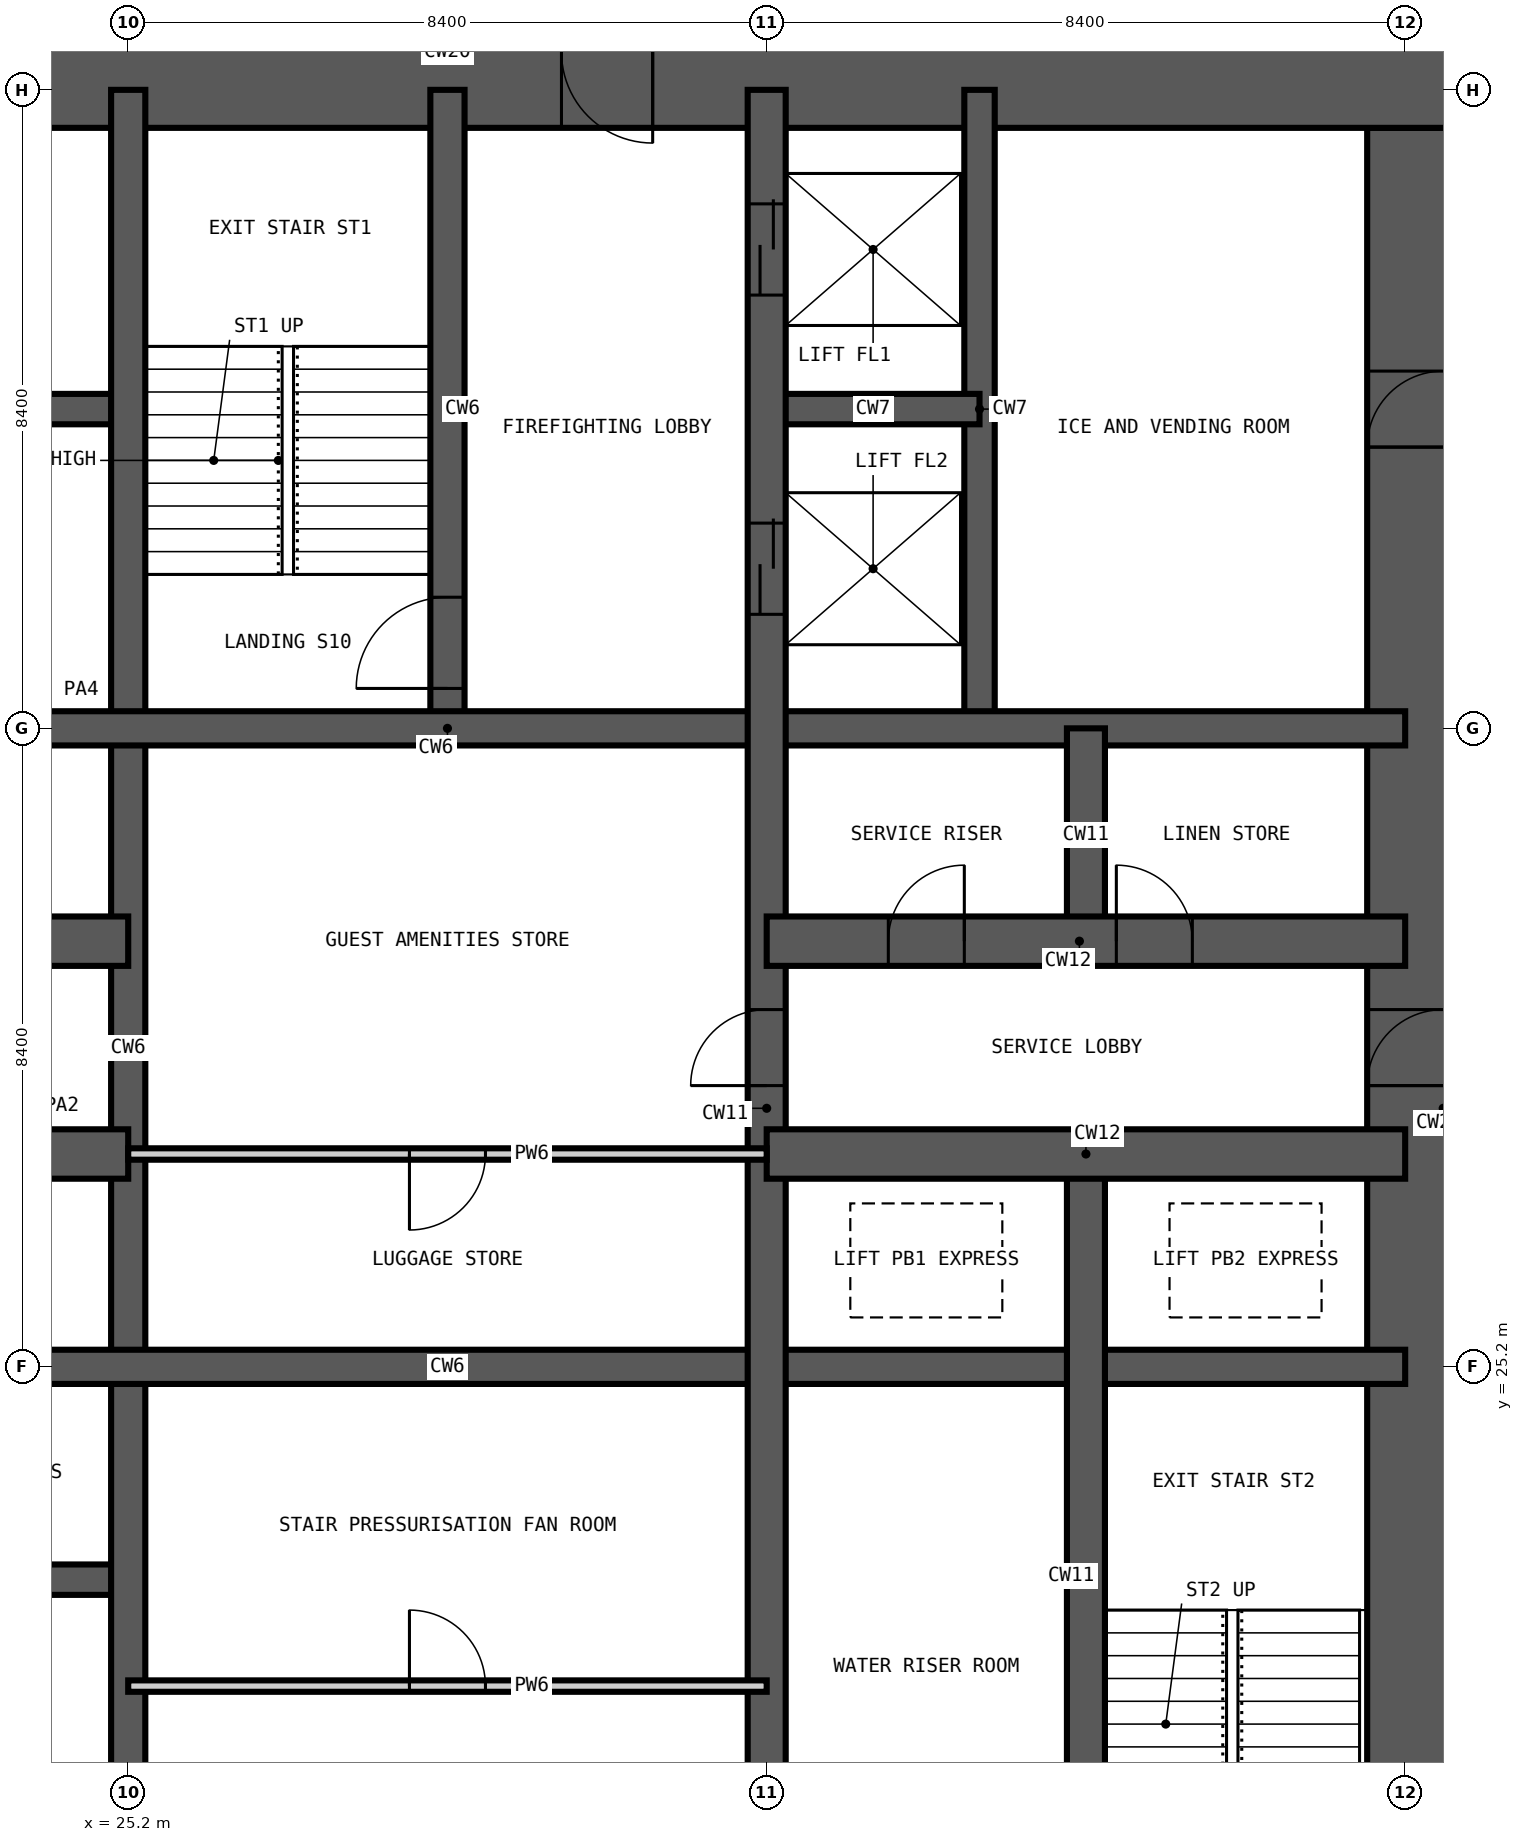
"""IFC4 building model, lengths in metres.
Left out: names, types, materials, properties, quantities, classifications, styles, units other than length and angle.
Written with IfcOpenShell. Run it as: python <this file> out.ifc"""

import sys

from ifc_helpers import new_model, si_unit, direction, frame, frame_2d, origin, place, context, subcontext, project, spatial, rectangle, extrude, element, fill, save


model = new_model("IFC4")
c1 = context("Model", 3, precision=1e-05, world=origin(), true_north=direction((0.0, 1.0)))
c2 = subcontext(c1, "Body", "Model", "MODEL_VIEW")
j1 = project(units=[si_unit("LENGTHUNIT", "METRE"), si_unit("PLANEANGLEUNIT", "RADIAN")], contexts=[c1])
p1 = place(None, origin())
s1 = spatial("IfcSite", under=j1, at=p1, CompositionType="ELEMENT")
p2 = place(p1, origin())
s2 = spatial("IfcBuilding", under=s1, at=p2, CompositionType="ELEMENT")
p3 = place(p2, frame((0.0, 0.0, 27.0)))
s3 = spatial("IfcBuildingStorey", under=s2, at=p3, CompositionType="ELEMENT", Elevation=27.0)
p4 = place(p3, frame((42.5, 17.3, -0.35), z_axis=(0.0, 0.0, 1.0), x_axis=(0.0, 1.0, 0.0)))
e1 = element("IfcWall", 1, at=p4, inside=s3, PredefinedType="SHEAR", context=c2, shape_type="SweptSolid", body=[
    extrude(rectangle(XDim=24.2, YDim=2.0, at=frame_2d((12.1, 0.0))), origin(), (0.0, 0.0, 1.0), 3.6),
])
p5 = place(p4, frame((0.3, 0.0, 0.35)))
e2 = element("IfcOpeningElement", 2, at=p5, cuts=e1, PredefinedType="OPENING", context=c2, shape_type="SweptSolid", body=[
    extrude(rectangle(XDim=1.2, YDim=2.2, at=frame_2d((0.6, 1.1))), frame((0.0, 1.01, 0.0), z_axis=(0.0, -1.0, 0.0), x_axis=(1.0, 0.0, 0.0)), (0.0, 0.0, 1.0), 2.02),
])
p6 = place(p4, frame((11.6, 0.0, 0.35)))
e3 = element("IfcOpeningElement", 3, at=p6, cuts=e1, PredefinedType="OPENING", context=c2, shape_type="SweptSolid", body=[
    extrude(rectangle(XDim=1.0, YDim=2.1, at=frame_2d((0.5, 1.05))), frame((0.0, 1.01, 0.0), z_axis=(0.0, -1.0, 0.0), x_axis=(1.0, 0.0, 0.0)), (0.0, 0.0, 1.0), 2.02),
])
p7 = place(p4, frame((20.0, 0.0, 0.35)))
e4 = element("IfcOpeningElement", 4, at=p7, cuts=e1, PredefinedType="OPENING", context=c2, shape_type="SweptSolid", body=[
    extrude(rectangle(XDim=1.0, YDim=2.1, at=frame_2d((0.5, 1.05))), frame((0.0, 1.01, 0.0), z_axis=(0.0, -1.0, 0.0), x_axis=(1.0, 0.0, 0.0)), (0.0, 0.0, 1.0), 2.02),
])
p8 = place(p3, frame((43.5, 42.5, -0.35), z_axis=(0.0, 0.0, 1.0), x_axis=(-1.0, 0.0, 0.0)))
e5 = element("IfcWall", 5, at=p8, inside=s3, PredefinedType="SHEAR", context=c2, shape_type="SweptSolid", body=[
    extrude(rectangle(XDim=28.2, YDim=2.0, at=frame_2d((14.1, 0.0))), origin(), (0.0, 0.0, 1.0), 3.6),
])
p9 = place(p8, frame((22.0, 0.0, 0.35)))
e6 = element("IfcOpeningElement", 6, at=p9, cuts=e5, PredefinedType="OPENING", context=c2, shape_type="SweptSolid", body=[
    extrude(rectangle(XDim=1.0, YDim=2.1, at=frame_2d((0.5, 1.05))), frame((0.0, 1.01, 0.0), z_axis=(0.0, -1.0, 0.0), x_axis=(1.0, 0.0, 0.0)), (0.0, 0.0, 1.0), 2.02),
])
p10 = place(p8, frame((11.4, 0.0, 0.35)))
e7 = element("IfcOpeningElement", 7, at=p10, cuts=e5, PredefinedType="OPENING", context=c2, shape_type="SweptSolid", body=[
    extrude(rectangle(XDim=1.2, YDim=2.2, at=frame_2d((0.6, 1.1))), frame((0.0, 1.01, 0.0), z_axis=(0.0, -1.0, 0.0), x_axis=(1.0, 0.0, 0.0)), (0.0, 0.0, 1.0), 2.02),
])
for number, where, z_axis, x_axis in (
    (8, (36.4, 33.6, -0.35), (0.0, 0.0, 1.0), (0.0, 1.0, 0.0)),
    (9, (16.8, 22.4, -0.35), (0.0, 0.0, 1.0), (1.0, 0.0, 0.0)),
    (10, (16.8, 37.8, -0.35), (0.0, 0.0, 1.0), (1.0, 0.0, 0.0)),
):
    element("IfcWall", number, at=place(p3, frame(where, z_axis=z_axis, x_axis=x_axis)), inside=s3, PredefinedType="SHEAR", context=c2, shape_type="SweptSolid", body=[
        extrude(rectangle(XDim=8.4, YDim=0.4, at=frame_2d((4.2, 0.0))), origin(), (0.0, 0.0, 1.0), 3.6),
    ])
p11 = place(p3, frame((33.6, 37.8, -0.35), z_axis=(0.0, 0.0, 1.0), x_axis=(1.0, 0.0, 0.0)))
e11 = element("IfcWall", 11, at=p11, inside=s3, PredefinedType="SHEAR", context=c2, shape_type="SweptSolid", body=[
    extrude(rectangle(XDim=2.8, YDim=0.4, at=frame_2d((1.4, 0.0))), origin(), (0.0, 0.0, 1.0), 3.6),
])
p12 = place(p3, frame((25.2, 16.8, -0.35), z_axis=(0.0, 0.0, 1.0), x_axis=(0.0, 1.0, 0.0)))
e12 = element("IfcWall", 12, at=p12, inside=s3, PredefinedType="SHEAR", context=c2, shape_type="SweptSolid", body=[
    extrude(rectangle(XDim=25.2, YDim=0.45, at=frame_2d((12.6, 0.0))), origin(), (0.0, 0.0, 1.0), 3.6),
])
p13 = place(p3, frame((29.4, 33.6, -0.35), z_axis=(0.0, 0.0, 1.0), x_axis=(0.0, 1.0, 0.0)))
e13 = element("IfcWall", 13, at=p13, inside=s3, PredefinedType="SHEAR", context=c2, shape_type="SweptSolid", body=[
    extrude(rectangle(XDim=8.4, YDim=0.45, at=frame_2d((4.2, 0.0))), origin(), (0.0, 0.0, 1.0), 3.6),
])
p14 = place(p13, frame((0.525, 0.0, 0.35)))
e14 = element("IfcOpeningElement", 14, at=p14, cuts=e13, PredefinedType="OPENING", context=c2, shape_type="SweptSolid", body=[
    extrude(rectangle(XDim=1.2, YDim=2.2, at=frame_2d((0.6, 1.1))), frame((0.0, 0.235, 0.0), z_axis=(0.0, -1.0, 0.0), x_axis=(1.0, 0.0, 0.0)), (0.0, 0.0, 1.0), 0.47),
])
for number, where, z_axis, x_axis in (
    (15, (16.8, 25.2, -0.35), (0.0, 0.0, 1.0), (1.0, 0.0, 0.0)),
    (16, (16.8, 33.6, -0.35), (0.0, 0.0, 1.0), (1.0, 0.0, 0.0)),
):
    element("IfcWall", number, at=place(p3, frame(where, z_axis=z_axis, x_axis=x_axis)), inside=s3, PredefinedType="SHEAR", context=c2, shape_type="SweptSolid", body=[
        extrude(rectangle(XDim=25.2, YDim=0.45, at=frame_2d((12.6, 0.0))), origin(), (0.0, 0.0, 1.0), 3.6),
    ])
p15 = place(p3, frame((33.6, 16.8, -0.35), z_axis=(0.0, 0.0, 1.0), x_axis=(0.0, 1.0, 0.0)))
e17 = element("IfcWall", 17, at=p15, inside=s3, PredefinedType="SHEAR", context=c2, shape_type="SweptSolid", body=[
    extrude(rectangle(XDim=25.2, YDim=0.5, at=frame_2d((12.6, 0.0))), origin(), (0.0, 0.0, 1.0), 3.6),
])
p16 = place(p15, frame((22.5, 0.0, 0.35)))
e18 = element("IfcOpeningElement", 18, at=p16, cuts=e17, PredefinedType="OPENING", context=c2, shape_type="SweptSolid", body=[
    extrude(rectangle(XDim=1.2, YDim=2.2, at=frame_2d((0.6, 1.1))), frame((0.0, 0.26, 0.0), z_axis=(0.0, -1.0, 0.0), x_axis=(1.0, 0.0, 0.0)), (0.0, 0.0, 1.0), 0.52),
])
p17 = place(p15, frame((18.3, 0.0, 0.35)))
e19 = element("IfcOpeningElement", 19, at=p17, cuts=e17, PredefinedType="OPENING", context=c2, shape_type="SweptSolid", body=[
    extrude(rectangle(XDim=1.2, YDim=2.2, at=frame_2d((0.6, 1.1))), frame((0.0, 0.26, 0.0), z_axis=(0.0, -1.0, 0.0), x_axis=(1.0, 0.0, 0.0)), (0.0, 0.0, 1.0), 0.52),
])
p18 = place(p15, frame((12.1, 0.0, 0.35)))
e20 = element("IfcOpeningElement", 20, at=p18, cuts=e17, PredefinedType="OPENING", context=c2, shape_type="SweptSolid", body=[
    extrude(rectangle(XDim=1.0, YDim=2.1, at=frame_2d((0.5, 1.05))), frame((0.0, 0.26, 0.0), z_axis=(0.0, -1.0, 0.0), x_axis=(1.0, 0.0, 0.0)), (0.0, 0.0, 1.0), 0.52),
])
p19 = place(p3, frame((37.8, 16.8, -0.35), z_axis=(0.0, 0.0, 1.0), x_axis=(0.0, 1.0, 0.0)))
e21 = element("IfcWall", 21, at=p19, inside=s3, PredefinedType="SHEAR", context=c2, shape_type="SweptSolid", body=[
    extrude(rectangle(XDim=11.2, YDim=0.5, at=frame_2d((5.6, 0.0))), origin(), (0.0, 0.0, 1.0), 3.6),
])
p20 = place(p3, frame((37.8, 30.8, -0.35), z_axis=(0.0, 0.0, 1.0), x_axis=(0.0, 1.0, 0.0)))
e22 = element("IfcWall", 22, at=p20, inside=s3, PredefinedType="SHEAR", context=c2, shape_type="SweptSolid", body=[
    extrude(rectangle(XDim=2.8, YDim=0.5, at=frame_2d((1.4, 0.0))), origin(), (0.0, 0.0, 1.0), 3.6),
])
p21 = place(p3, frame((16.8, 28.0, -0.35), z_axis=(0.0, 0.0, 1.0), x_axis=(1.0, 0.0, 0.0)))
e23 = element("IfcWall", 23, at=p21, inside=s3, PredefinedType="SHEAR", context=c2, shape_type="SweptSolid", body=[
    extrude(rectangle(XDim=8.4, YDim=0.65, at=frame_2d((4.2, 0.0))), origin(), (0.0, 0.0, 1.0), 3.6),
])
p22 = place(p21, frame((1.55, 0.0, 0.35)))
e24 = element("IfcOpeningElement", 24, at=p22, cuts=e23, PredefinedType="OPENING", context=c2, shape_type="SweptSolid", body=[
    extrude(rectangle(XDim=1.1, YDim=2.2, at=frame_2d((0.55, 1.1))), frame((0.0, 0.335, 0.0), z_axis=(0.0, -1.0, 0.0), x_axis=(1.0, 0.0, 0.0)), (0.0, 0.0, 1.0), 0.67),
])
p23 = place(p21, frame((5.75, 0.0, 0.35)))
e25 = element("IfcOpeningElement", 25, at=p23, cuts=e23, PredefinedType="OPENING", context=c2, shape_type="SweptSolid", body=[
    extrude(rectangle(XDim=1.1, YDim=2.2, at=frame_2d((0.55, 1.1))), frame((0.0, 0.335, 0.0), z_axis=(0.0, -1.0, 0.0), x_axis=(1.0, 0.0, 0.0)), (0.0, 0.0, 1.0), 0.67),
])
p24 = place(p3, frame((33.6, 28.0, -0.35), z_axis=(0.0, 0.0, 1.0), x_axis=(1.0, 0.0, 0.0)))
e26 = element("IfcWall", 26, at=p24, inside=s3, PredefinedType="SHEAR", context=c2, shape_type="SweptSolid", body=[
    extrude(rectangle(XDim=8.4, YDim=0.65, at=frame_2d((4.2, 0.0))), origin(), (0.0, 0.0, 1.0), 3.6),
])
p25 = place(p3, frame((16.8, 30.8, -0.35), z_axis=(0.0, 0.0, 1.0), x_axis=(1.0, 0.0, 0.0)))
e27 = element("IfcWall", 27, at=p25, inside=s3, PredefinedType="SHEAR", context=c2, shape_type="SweptSolid", body=[
    extrude(rectangle(XDim=8.4, YDim=0.65, at=frame_2d((4.2, 0.0))), origin(), (0.0, 0.0, 1.0), 3.6),
])
p26 = place(p25, frame((1.55, 0.0, 0.35)))
e28 = element("IfcOpeningElement", 28, at=p26, cuts=e27, PredefinedType="OPENING", context=c2, shape_type="SweptSolid", body=[
    extrude(rectangle(XDim=1.1, YDim=2.2, at=frame_2d((0.55, 1.1))), frame((0.0, 0.335, 0.0), z_axis=(0.0, -1.0, 0.0), x_axis=(1.0, 0.0, 0.0)), (0.0, 0.0, 1.0), 0.67),
])
p27 = place(p25, frame((5.75, 0.0, 0.35)))
e29 = element("IfcOpeningElement", 29, at=p27, cuts=e27, PredefinedType="OPENING", context=c2, shape_type="SweptSolid", body=[
    extrude(rectangle(XDim=1.1, YDim=2.2, at=frame_2d((0.55, 1.1))), frame((0.0, 0.335, 0.0), z_axis=(0.0, -1.0, 0.0), x_axis=(1.0, 0.0, 0.0)), (0.0, 0.0, 1.0), 0.67),
])
p28 = place(p3, frame((33.6, 30.8, -0.35), z_axis=(0.0, 0.0, 1.0), x_axis=(1.0, 0.0, 0.0)))
e30 = element("IfcWall", 30, at=p28, inside=s3, PredefinedType="SHEAR", context=c2, shape_type="SweptSolid", body=[
    extrude(rectangle(XDim=8.4, YDim=0.65, at=frame_2d((4.2, 0.0))), origin(), (0.0, 0.0, 1.0), 3.6),
])
p29 = place(p28, frame((1.6, 0.0, 0.35)))
e31 = element("IfcOpeningElement", 31, at=p29, cuts=e30, PredefinedType="OPENING", context=c2, shape_type="SweptSolid", body=[
    extrude(rectangle(XDim=1.0, YDim=2.1, at=frame_2d((0.5, 1.05))), frame((0.0, 0.335, 0.0), z_axis=(0.0, -1.0, 0.0), x_axis=(1.0, 0.0, 0.0)), (0.0, 0.0, 1.0), 0.67),
])
p30 = place(p28, frame((4.6, 0.0, 0.35)))
e32 = element("IfcOpeningElement", 32, at=p30, cuts=e30, PredefinedType="OPENING", context=c2, shape_type="SweptSolid", body=[
    extrude(rectangle(XDim=1.0, YDim=2.1, at=frame_2d((0.5, 1.05))), frame((0.0, 0.335, 0.0), z_axis=(0.0, -1.0, 0.0), x_axis=(1.0, 0.0, 0.0)), (0.0, 0.0, 1.0), 0.67),
])
p31 = place(p3, frame((25.2, 21.0, 0.0), z_axis=(0.0, 0.0, 1.0), x_axis=(1.0, 0.0, 0.0)))
e33 = element("IfcWall", 33, at=p31, inside=s3, PredefinedType="PARTITIONING", context=c2, shape_type="SweptSolid", body=[
    extrude(rectangle(XDim=8.4, YDim=0.15, at=frame_2d((4.2, 0.0))), origin(), (0.0, 0.0, 1.0), 3.25),
])
p32 = place(p31, frame((3.7, 0.0, 0.0)))
e34 = element("IfcOpeningElement", 34, at=p32, cuts=e33, PredefinedType="OPENING", context=c2, shape_type="SweptSolid", body=[
    extrude(rectangle(XDim=1.0, YDim=2.1, at=frame_2d((0.5, 1.05))), frame((0.0, 0.085, 0.0), z_axis=(0.0, -1.0, 0.0), x_axis=(1.0, 0.0, 0.0)), (0.0, 0.0, 1.0), 0.17),
])
p33 = place(p3, frame((25.2, 28.0, 0.0), z_axis=(0.0, 0.0, 1.0), x_axis=(1.0, 0.0, 0.0)))
e35 = element("IfcWall", 35, at=p33, inside=s3, PredefinedType="PARTITIONING", context=c2, shape_type="SweptSolid", body=[
    extrude(rectangle(XDim=8.4, YDim=0.15, at=frame_2d((4.2, 0.0))), origin(), (0.0, 0.0, 1.0), 3.25),
])
p34 = place(p33, frame((3.7, 0.0, 0.0)))
e36 = element("IfcOpeningElement", 36, at=p34, cuts=e35, PredefinedType="OPENING", context=c2, shape_type="SweptSolid", body=[
    extrude(rectangle(XDim=1.0, YDim=2.1, at=frame_2d((0.5, 1.05))), frame((0.0, 0.085, 0.0), z_axis=(0.0, -1.0, 0.0), x_axis=(1.0, 0.0, 0.0)), (0.0, 0.0, 1.0), 0.17),
])
p35 = place(p14, origin())
e37 = element("IfcDoor", 37, at=p35, inside=s3, OperationType="SINGLE_SWING_LEFT", PredefinedType="DOOR", context=c2, shape_type="SweptSolid", body=[
    extrude(rectangle(XDim=1.2, YDim=2.2, at=frame_2d((0.6, 1.1))), frame((0.0, 0.025, 0.0), z_axis=(0.0, -1.0, 0.0), x_axis=(1.0, 0.0, 0.0)), (0.0, 0.0, 1.0), 0.05),
])
fill(e14, e37)
p36 = place(p16, origin())
e38 = element("IfcDoor", 38, at=p36, inside=s3, OperationType="DOUBLE_DOOR_SLIDING", PredefinedType="DOOR", context=c2, shape_type="SweptSolid", body=[
    extrude(rectangle(XDim=1.2, YDim=2.2, at=frame_2d((0.6, 1.1))), frame((0.0, 0.025, 0.0), z_axis=(0.0, -1.0, 0.0), x_axis=(1.0, 0.0, 0.0)), (0.0, 0.0, 1.0), 0.05),
])
fill(e18, e38)
p37 = place(p17, origin())
e39 = element("IfcDoor", 39, at=p37, inside=s3, OperationType="DOUBLE_DOOR_SLIDING", PredefinedType="DOOR", context=c2, shape_type="SweptSolid", body=[
    extrude(rectangle(XDim=1.2, YDim=2.2, at=frame_2d((0.6, 1.1))), frame((0.0, 0.025, 0.0), z_axis=(0.0, -1.0, 0.0), x_axis=(1.0, 0.0, 0.0)), (0.0, 0.0, 1.0), 0.05),
])
fill(e19, e39)
p38 = place(p18, origin())
e40 = element("IfcDoor", 40, at=p38, inside=s3, OperationType="SINGLE_SWING_LEFT", PredefinedType="DOOR", context=c2, shape_type="SweptSolid", body=[
    extrude(rectangle(XDim=1.0, YDim=2.1, at=frame_2d((0.5, 1.05))), frame((0.0, 0.025, 0.0), z_axis=(0.0, -1.0, 0.0), x_axis=(1.0, 0.0, 0.0)), (0.0, 0.0, 1.0), 0.05),
])
fill(e20, e40)
p39 = place(p34, frame((1.0, 0.0, 0.0), z_axis=(0.0, 0.0, 1.0), x_axis=(-1.0, 0.0, 0.0)))
e41 = element("IfcDoor", 41, at=p39, inside=s3, OperationType="SINGLE_SWING_RIGHT", PredefinedType="DOOR", context=c2, shape_type="SweptSolid", body=[
    extrude(rectangle(XDim=1.0, YDim=2.1, at=frame_2d((0.5, 1.05))), frame((0.0, 0.025, 0.0), z_axis=(0.0, -1.0, 0.0), x_axis=(1.0, 0.0, 0.0)), (0.0, 0.0, 1.0), 0.05),
])
fill(e36, e41)
p40 = place(p29, origin())
e42 = element("IfcDoor", 42, at=p40, inside=s3, OperationType="SINGLE_SWING_RIGHT", PredefinedType="DOOR", context=c2, shape_type="SweptSolid", body=[
    extrude(rectangle(XDim=1.0, YDim=2.1, at=frame_2d((0.5, 1.05))), frame((0.0, 0.025, 0.0), z_axis=(0.0, -1.0, 0.0), x_axis=(1.0, 0.0, 0.0)), (0.0, 0.0, 1.0), 0.05),
])
fill(e31, e42)
p41 = place(p30, origin())
e43 = element("IfcDoor", 43, at=p41, inside=s3, OperationType="SINGLE_SWING_LEFT", PredefinedType="DOOR", context=c2, shape_type="SweptSolid", body=[
    extrude(rectangle(XDim=1.0, YDim=2.1, at=frame_2d((0.5, 1.05))), frame((0.0, 0.025, 0.0), z_axis=(0.0, -1.0, 0.0), x_axis=(1.0, 0.0, 0.0)), (0.0, 0.0, 1.0), 0.05),
])
fill(e32, e43)
p42 = place(p6, origin())
e44 = element("IfcDoor", 44, at=p42, inside=s3, OperationType="SINGLE_SWING_LEFT", PredefinedType="DOOR", context=c2, shape_type="SweptSolid", body=[
    extrude(rectangle(XDim=1.0, YDim=2.1, at=frame_2d((0.5, 1.05))), frame((0.0, 0.025, 0.0), z_axis=(0.0, -1.0, 0.0), x_axis=(1.0, 0.0, 0.0)), (0.0, 0.0, 1.0), 0.05),
])
fill(e3, e44)
p43 = place(p10, origin())
e45 = element("IfcDoor", 45, at=p43, inside=s3, OperationType="SINGLE_SWING_LEFT", PredefinedType="DOOR", context=c2, shape_type="SweptSolid", body=[
    extrude(rectangle(XDim=1.2, YDim=2.2, at=frame_2d((0.6, 1.1))), frame((0.0, 0.025, 0.0), z_axis=(0.0, -1.0, 0.0), x_axis=(1.0, 0.0, 0.0)), (0.0, 0.0, 1.0), 0.05),
])
fill(e7, e45)
p44 = place(p7, origin())
e46 = element("IfcDoor", 46, at=p44, inside=s3, OperationType="SINGLE_SWING_LEFT", PredefinedType="DOOR", context=c2, shape_type="SweptSolid", body=[
    extrude(rectangle(XDim=1.0, YDim=2.1, at=frame_2d((0.5, 1.05))), frame((0.0, 0.025, 0.0), z_axis=(0.0, -1.0, 0.0), x_axis=(1.0, 0.0, 0.0)), (0.0, 0.0, 1.0), 0.05),
])
fill(e4, e46)
p45 = place(p32, origin())
e47 = element("IfcDoor", 47, at=p45, inside=s3, OperationType="SINGLE_SWING_LEFT", PredefinedType="DOOR", context=c2, shape_type="SweptSolid", body=[
    extrude(rectangle(XDim=1.0, YDim=2.1, at=frame_2d((0.5, 1.05))), frame((0.0, 0.025, 0.0), z_axis=(0.0, -1.0, 0.0), x_axis=(1.0, 0.0, 0.0)), (0.0, 0.0, 1.0), 0.05),
])
fill(e34, e47)
save(model, sys.argv[1])
